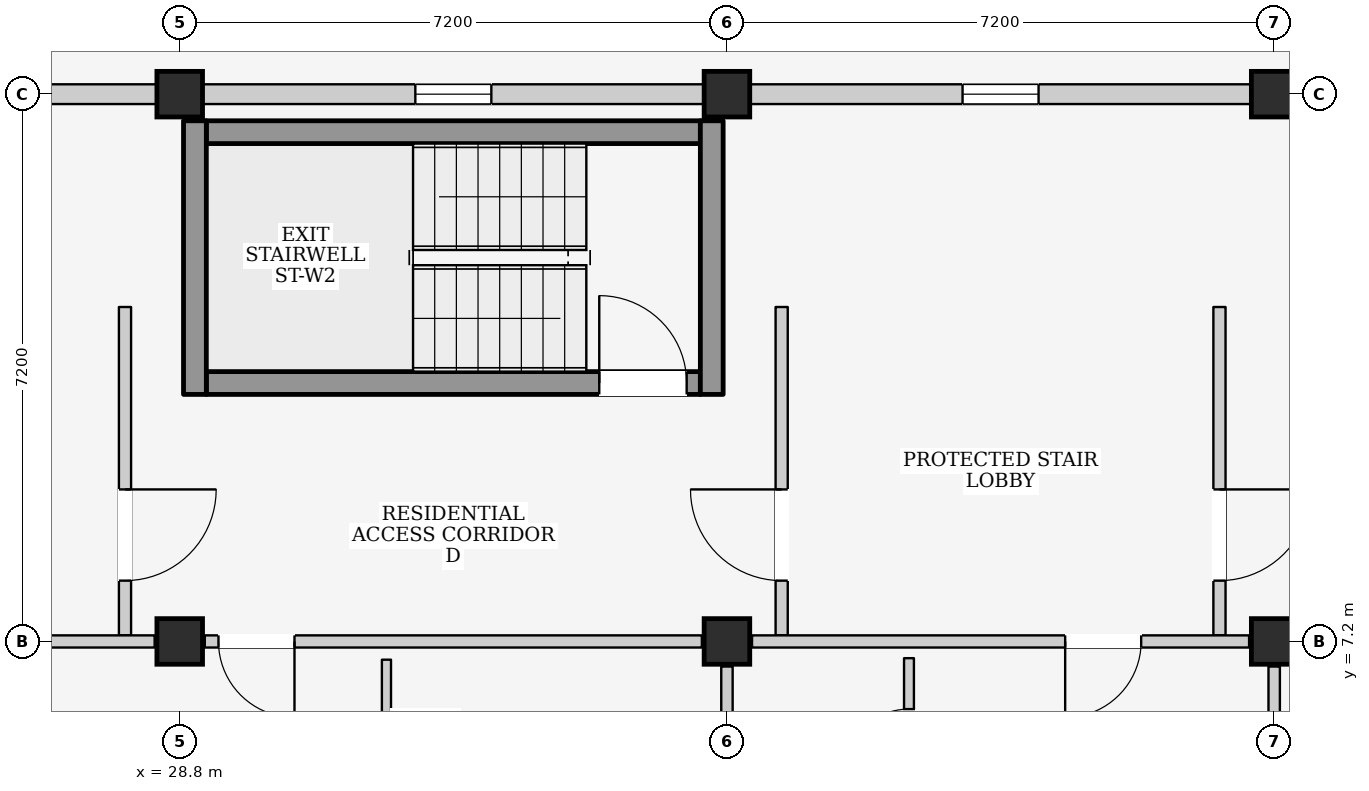
"""IFC4 building model, lengths in metres.
Left out: names, types, materials, properties, quantities, classifications, styles, units other than length and angle.
Written with IfcOpenShell. Run it as: python <this file> out.ifc"""

import sys

from ifc_helpers import new_model, si_unit, direction, frame, frame_2d, origin, origin_2d, place, context, subcontext, project, spatial, rectangle, extrude, element, fill, save


model = new_model("IFC4")
c1 = context("Model", 3, precision=1e-05, world=origin(), true_north=direction((0.0, 1.0)))
c2 = subcontext(c1, "Body", "Model", "MODEL_VIEW")
j1 = project(units=[si_unit("LENGTHUNIT", "METRE"), si_unit("PLANEANGLEUNIT", "RADIAN")], contexts=[c1])
p1 = place(None, origin())
s1 = spatial("IfcSite", under=j1, at=p1, CompositionType="ELEMENT")
p2 = place(p1, origin())
s2 = spatial("IfcBuilding", under=s1, at=p2, CompositionType="ELEMENT")
p3 = place(p2, frame((0.0, 0.0, 15.4)))
s3 = spatial("IfcBuildingStorey", under=s2, at=p3, CompositionType="ELEMENT", Elevation=15.4)
for number, where, z_axis, x_axis in (
    (1, (28.8, 7.2, 0.0), (0.0, 0.0, 1.0), (1.0, 0.0, 0.0)),
    (2, (28.8, 14.4, 0.0), (0.0, 0.0, 1.0), (1.0, 0.0, 0.0)),
    (3, (36.0, 7.2, 0.0), (0.0, 0.0, 1.0), (1.0, 0.0, 0.0)),
    (4, (36.0, 14.4, 0.0), (0.0, 0.0, 1.0), (1.0, 0.0, 0.0)),
    (5, (43.2, 7.2, 0.0), (0.0, 0.0, 1.0), (1.0, 0.0, 0.0)),
    (6, (43.2, 14.4, 0.0), (0.0, 0.0, 1.0), (1.0, 0.0, 0.0)),
):
    element("IfcColumn", number, at=place(p3, frame(where, z_axis=z_axis, x_axis=x_axis)), inside=s3, PredefinedType="COLUMN", context=c2, shape_type="SweptSolid", body=[
        extrude(rectangle(XDim=0.6, YDim=0.6, at=origin_2d()), origin(), (0.0, 0.0, 1.0), 3.2),
    ])
p4 = place(p3, frame((21.9, 14.4, 0.0), z_axis=(0.0, 0.0, 1.0), x_axis=(1.0, 0.0, 0.0)))
e7 = element("IfcWall", 7, at=p4, inside=s3, PredefinedType="ELEMENTEDWALL", context=c2, shape_type="SweptSolid", body=[
    extrude(rectangle(XDim=6.6, YDim=0.26, at=frame_2d((3.3, 0.0))), origin(), (0.0, 0.0, 1.0), 2.335),
])
p5 = place(p4, frame((2.8, 0.0, 1.2)))
e8 = element("IfcOpeningElement", 8, at=p5, cuts=e7, PredefinedType="OPENING", context=c2, shape_type="SweptSolid", body=[
    extrude(rectangle(XDim=1.0, YDim=0.9, at=frame_2d((0.5, 0.45))), frame((0.0, 0.145, 0.0), z_axis=(0.0, -1.0, 0.0), x_axis=(1.0, 0.0, 0.0)), (0.0, 0.0, 1.0), 0.29),
])
p6 = place(p3, frame((29.1, 14.4, 0.0), z_axis=(0.0, 0.0, 1.0), x_axis=(1.0, 0.0, 0.0)))
e9 = element("IfcWall", 9, at=p6, inside=s3, PredefinedType="ELEMENTEDWALL", context=c2, shape_type="SweptSolid", body=[
    extrude(rectangle(XDim=6.6, YDim=0.26, at=frame_2d((3.3, 0.0))), origin(), (0.0, 0.0, 1.0), 2.335),
])
p7 = place(p6, frame((2.8, 0.0, 1.2)))
e10 = element("IfcOpeningElement", 10, at=p7, cuts=e9, PredefinedType="OPENING", context=c2, shape_type="SweptSolid", body=[
    extrude(rectangle(XDim=1.0, YDim=0.9, at=frame_2d((0.5, 0.45))), frame((0.0, 0.145, 0.0), z_axis=(0.0, -1.0, 0.0), x_axis=(1.0, 0.0, 0.0)), (0.0, 0.0, 1.0), 0.29),
])
p8 = place(p3, frame((36.3, 14.4, 0.0), z_axis=(0.0, 0.0, 1.0), x_axis=(1.0, 0.0, 0.0)))
e11 = element("IfcWall", 11, at=p8, inside=s3, PredefinedType="ELEMENTEDWALL", context=c2, shape_type="SweptSolid", body=[
    extrude(rectangle(XDim=6.6, YDim=0.26, at=frame_2d((3.3, 0.0))), origin(), (0.0, 0.0, 1.0), 2.335),
])
p9 = place(p8, frame((2.8, 0.0, 1.2)))
e12 = element("IfcOpeningElement", 12, at=p9, cuts=e11, PredefinedType="OPENING", context=c2, shape_type="SweptSolid", body=[
    extrude(rectangle(XDim=1.0, YDim=0.9, at=frame_2d((0.5, 0.45))), frame((0.0, 0.145, 0.0), z_axis=(0.0, -1.0, 0.0), x_axis=(1.0, 0.0, 0.0)), (0.0, 0.0, 1.0), 0.29),
])
p10 = place(p3, frame((28.08, 7.28, 0.0), z_axis=(0.0, 0.0, 1.0), x_axis=(0.0, 1.0, 0.0)))
e13 = element("IfcWall", 13, at=p10, inside=s3, PredefinedType="PARTITIONING", context=c2, shape_type="SweptSolid", body=[
    extrude(rectangle(XDim=4.32, YDim=0.16, at=frame_2d((2.16, 0.0))), origin(), (0.0, 0.0, 1.0), 2.95),
])
p11 = place(p10, frame((0.72, 0.0, 0.0)))
e14 = element("IfcOpeningElement", 14, at=p11, cuts=e13, PredefinedType="OPENING", context=c2, shape_type="SweptSolid", body=[
    extrude(rectangle(XDim=1.2, YDim=2.2, at=frame_2d((0.6, 1.1))), frame((0.0, 0.095, 0.0), z_axis=(0.0, -1.0, 0.0), x_axis=(1.0, 0.0, 0.0)), (0.0, 0.0, 1.0), 0.19),
])
p12 = place(p3, frame((29.15, 10.6, 0.0), z_axis=(0.0, 0.0, 1.0), x_axis=(1.0, 0.0, 0.0)))
e15 = element("IfcWall", 15, at=p12, inside=s3, PredefinedType="SHEAR", context=c2, shape_type="SweptSolid", body=[
    extrude(rectangle(XDim=6.5, YDim=0.3, at=frame_2d((3.25, 0.0))), origin(), (0.0, 0.0, 1.0), 2.95),
])
p13 = place(p12, frame((5.17, 0.0, 0.0)))
e16 = element("IfcOpeningElement", 16, at=p13, cuts=e15, PredefinedType="OPENING", context=c2, shape_type="SweptSolid", body=[
    extrude(rectangle(XDim=1.15, YDim=2.2, at=frame_2d((0.575, 1.1))), frame((0.0, 0.165, 0.0), z_axis=(0.0, -1.0, 0.0), x_axis=(1.0, 0.0, 0.0)), (0.0, 0.0, 1.0), 0.33),
])
p14 = place(p3, frame((29.15, 13.9, 0.0), z_axis=(0.0, 0.0, 1.0), x_axis=(1.0, 0.0, 0.0)))
e17 = element("IfcWall", 17, at=p14, inside=s3, PredefinedType="SHEAR", context=c2, shape_type="SweptSolid", body=[
    extrude(rectangle(XDim=6.5, YDim=0.3, at=frame_2d((3.25, 0.0))), origin(), (0.0, 0.0, 1.0), 2.95),
])
for number, where, z_axis, x_axis in (
    (18, (29.0, 10.45, 0.0), (0.0, 0.0, 1.0), (0.0, 1.0, 0.0)),
    (19, (35.8, 10.45, 0.0), (0.0, 0.0, 1.0), (0.0, 1.0, 0.0)),
):
    element("IfcWall", number, at=place(p3, frame(where, z_axis=z_axis, x_axis=x_axis)), inside=s3, PredefinedType="SHEAR", context=c2, shape_type="SweptSolid", body=[
        extrude(rectangle(XDim=3.6, YDim=0.3, at=frame_2d((1.8, 0.0))), origin(), (0.0, 0.0, 1.0), 2.95),
    ])
p15 = place(p3, frame((36.72, 7.28, 0.0), z_axis=(0.0, 0.0, 1.0), x_axis=(0.0, 1.0, 0.0)))
e20 = element("IfcWall", 20, at=p15, inside=s3, PredefinedType="PARTITIONING", context=c2, shape_type="SweptSolid", body=[
    extrude(rectangle(XDim=4.32, YDim=0.16, at=frame_2d((2.16, 0.0))), origin(), (0.0, 0.0, 1.0), 2.95),
])
p16 = place(p15, frame((0.72, 0.0, 0.0)))
e21 = element("IfcOpeningElement", 21, at=p16, cuts=e20, PredefinedType="OPENING", context=c2, shape_type="SweptSolid", body=[
    extrude(rectangle(XDim=1.2, YDim=2.2, at=frame_2d((0.6, 1.1))), frame((0.0, 0.095, 0.0), z_axis=(0.0, -1.0, 0.0), x_axis=(1.0, 0.0, 0.0)), (0.0, 0.0, 1.0), 0.19),
])
p17 = place(p3, frame((42.48, 7.28, 0.0), z_axis=(0.0, 0.0, 1.0), x_axis=(0.0, 1.0, 0.0)))
e22 = element("IfcWall", 22, at=p17, inside=s3, PredefinedType="PARTITIONING", context=c2, shape_type="SweptSolid", body=[
    extrude(rectangle(XDim=4.32, YDim=0.16, at=frame_2d((2.16, 0.0))), origin(), (0.0, 0.0, 1.0), 2.95),
])
p18 = place(p17, frame((0.72, 0.0, 0.0)))
e23 = element("IfcOpeningElement", 23, at=p18, cuts=e22, PredefinedType="OPENING", context=c2, shape_type="SweptSolid", body=[
    extrude(rectangle(XDim=1.2, YDim=2.2, at=frame_2d((0.6, 1.1))), frame((0.0, 0.095, 0.0), z_axis=(0.0, -1.0, 0.0), x_axis=(1.0, 0.0, 0.0)), (0.0, 0.0, 1.0), 0.19),
])
p19 = place(p3, frame((21.93, 7.2, 0.0), z_axis=(0.0, 0.0, 1.0), x_axis=(1.0, 0.0, 0.0)))
e24 = element("IfcWall", 24, at=p19, inside=s3, PredefinedType="PARTITIONING", context=c2, shape_type="SweptSolid", body=[
    extrude(rectangle(XDim=6.54, YDim=0.16, at=frame_2d((3.27, 0.0))), origin(), (0.0, 0.0, 1.0), 2.335),
])
p20 = place(p3, frame((29.13, 7.2, 0.0), z_axis=(0.0, 0.0, 1.0), x_axis=(1.0, 0.0, 0.0)))
e25 = element("IfcWall", 25, at=p20, inside=s3, PredefinedType="PARTITIONING", context=c2, shape_type="SweptSolid", body=[
    extrude(rectangle(XDim=6.54, YDim=0.16, at=frame_2d((3.27, 0.0))), origin(), (0.0, 0.0, 1.0), 2.335),
])
p21 = place(p20, frame((0.18, 0.0, 0.0)))
e26 = element("IfcOpeningElement", 26, at=p21, cuts=e25, PredefinedType="OPENING", context=c2, shape_type="SweptSolid", body=[
    extrude(rectangle(XDim=1.0, YDim=2.15, at=frame_2d((0.5, 1.075))), frame((0.0, 0.095, 0.0), z_axis=(0.0, -1.0, 0.0), x_axis=(1.0, 0.0, 0.0)), (0.0, 0.0, 1.0), 0.19),
])
p22 = place(p3, frame((36.0, 0.33, 0.0), z_axis=(0.0, 0.0, 1.0), x_axis=(0.0, 1.0, 0.0)))
e27 = element("IfcWall", 27, at=p22, inside=s3, PredefinedType="PARTITIONING", context=c2, shape_type="SweptSolid", body=[
    extrude(rectangle(XDim=6.54, YDim=0.15, at=frame_2d((3.27, 0.0))), origin(), (0.0, 0.0, 1.0), 2.385),
])
p23 = place(p3, frame((31.52, 3.92, 0.0), z_axis=(0.0, 0.0, 1.0), x_axis=(0.0, 1.0, 0.0)))
e28 = element("IfcWall", 28, at=p23, inside=s3, PredefinedType="PARTITIONING", context=c2, shape_type="SweptSolid", body=[
    extrude(rectangle(XDim=3.04, YDim=0.12, at=frame_2d((1.52, 0.0))), origin(), (0.0, 0.0, 1.0), 2.95),
])
p24 = place(p23, frame((1.04, 0.0, 0.0)))
e29 = element("IfcOpeningElement", 29, at=p24, cuts=e28, PredefinedType="OPENING", context=c2, shape_type="SweptSolid", body=[
    extrude(rectangle(XDim=0.96, YDim=2.15, at=frame_2d((0.48, 1.075))), frame((0.0, 0.075, 0.0), z_axis=(0.0, -1.0, 0.0), x_axis=(1.0, 0.0, 0.0)), (0.0, 0.0, 1.0), 0.15),
])
p25 = place(p3, frame((36.33, 7.2, 0.0), z_axis=(0.0, 0.0, 1.0), x_axis=(1.0, 0.0, 0.0)))
e30 = element("IfcWall", 30, at=p25, inside=s3, PredefinedType="PARTITIONING", context=c2, shape_type="SweptSolid", body=[
    extrude(rectangle(XDim=6.54, YDim=0.16, at=frame_2d((3.27, 0.0))), origin(), (0.0, 0.0, 1.0), 2.335),
])
p26 = place(p25, frame((4.12, 0.0, 0.0)))
e31 = element("IfcOpeningElement", 31, at=p26, cuts=e30, PredefinedType="OPENING", context=c2, shape_type="SweptSolid", body=[
    extrude(rectangle(XDim=1.0, YDim=2.15, at=frame_2d((0.5, 1.075))), frame((0.0, 0.095, 0.0), z_axis=(0.0, -1.0, 0.0), x_axis=(1.0, 0.0, 0.0)), (0.0, 0.0, 1.0), 0.19),
])
p27 = place(p3, frame((43.2, 0.33, 0.0), z_axis=(0.0, 0.0, 1.0), x_axis=(0.0, 1.0, 0.0)))
e32 = element("IfcWall", 32, at=p27, inside=s3, PredefinedType="PARTITIONING", context=c2, shape_type="SweptSolid", body=[
    extrude(rectangle(XDim=6.54, YDim=0.15, at=frame_2d((3.27, 0.0))), origin(), (0.0, 0.0, 1.0), 2.385),
])
p28 = place(p3, frame((38.395, 4.76, 0.0), z_axis=(0.0, 0.0, 1.0), x_axis=(0.0, 1.0, 0.0)))
e33 = element("IfcWall", 33, at=p28, inside=s3, PredefinedType="PARTITIONING", context=c2, shape_type="SweptSolid", body=[
    extrude(rectangle(XDim=2.22, YDim=0.13, at=frame_2d((1.11, 0.0))), origin(), (0.0, 0.0, 1.0), 2.95),
])
p29 = place(p28, frame((0.67, 0.0, 0.0)))
e34 = element("IfcOpeningElement", 34, at=p29, cuts=e33, PredefinedType="OPENING", context=c2, shape_type="SweptSolid", body=[
    extrude(rectangle(XDim=0.88, YDim=2.1, at=frame_2d((0.44, 1.05))), frame((0.0, 0.08, 0.0), z_axis=(0.0, -1.0, 0.0), x_axis=(1.0, 0.0, 0.0)), (0.0, 0.0, 1.0), 0.16),
])
p30 = place(p7, origin())
e35 = element("IfcWindow", 35, at=p30, inside=s3, PartitioningType="SINGLE_PANEL", PredefinedType="WINDOW", context=c2, shape_type="SweptSolid", body=[
    extrude(rectangle(XDim=1.0, YDim=0.9, at=frame_2d((0.5, 0.45))), frame((0.0, 0.03, 0.0), z_axis=(0.0, -1.0, 0.0), x_axis=(1.0, 0.0, 0.0)), (0.0, 0.0, 1.0), 0.06),
])
fill(e10, e35)
p31 = place(p9, origin())
e36 = element("IfcWindow", 36, at=p31, inside=s3, PartitioningType="SINGLE_PANEL", PredefinedType="WINDOW", context=c2, shape_type="SweptSolid", body=[
    extrude(rectangle(XDim=1.0, YDim=0.9, at=frame_2d((0.5, 0.45))), frame((0.0, 0.03, 0.0), z_axis=(0.0, -1.0, 0.0), x_axis=(1.0, 0.0, 0.0)), (0.0, 0.0, 1.0), 0.06),
])
fill(e12, e36)
p32 = place(p11, frame((1.2, 0.0, 0.0), z_axis=(0.0, 0.0, 1.0), x_axis=(-1.0, 0.0, 0.0)))
e37 = element("IfcDoor", 37, at=p32, inside=s3, OperationType="SINGLE_SWING_LEFT", PredefinedType="DOOR", context=c2, shape_type="SweptSolid", body=[
    extrude(rectangle(XDim=1.2, YDim=2.2, at=frame_2d((0.6, 1.1))), frame((0.0, 0.025, 0.0), z_axis=(0.0, -1.0, 0.0), x_axis=(1.0, 0.0, 0.0)), (0.0, 0.0, 1.0), 0.05),
])
fill(e14, e37)
p33 = place(p13, origin())
e38 = element("IfcDoor", 38, at=p33, inside=s3, OperationType="SINGLE_SWING_LEFT", PredefinedType="DOOR", context=c2, shape_type="SweptSolid", body=[
    extrude(rectangle(XDim=1.15, YDim=2.2, at=frame_2d((0.575, 1.1))), frame((0.0, 0.025, 0.0), z_axis=(0.0, -1.0, 0.0), x_axis=(1.0, 0.0, 0.0)), (0.0, 0.0, 1.0), 0.05),
])
fill(e16, e38)
p34 = place(p16, origin())
e39 = element("IfcDoor", 39, at=p34, inside=s3, OperationType="SINGLE_SWING_RIGHT", PredefinedType="DOOR", context=c2, shape_type="SweptSolid", body=[
    extrude(rectangle(XDim=1.2, YDim=2.2, at=frame_2d((0.6, 1.1))), frame((0.0, 0.025, 0.0), z_axis=(0.0, -1.0, 0.0), x_axis=(1.0, 0.0, 0.0)), (0.0, 0.0, 1.0), 0.05),
])
fill(e21, e39)
p35 = place(p18, frame((1.2, 0.0, 0.0), z_axis=(0.0, 0.0, 1.0), x_axis=(-1.0, 0.0, 0.0)))
e40 = element("IfcDoor", 40, at=p35, inside=s3, OperationType="SINGLE_SWING_LEFT", PredefinedType="DOOR", context=c2, shape_type="SweptSolid", body=[
    extrude(rectangle(XDim=1.2, YDim=2.2, at=frame_2d((0.6, 1.1))), frame((0.0, 0.025, 0.0), z_axis=(0.0, -1.0, 0.0), x_axis=(1.0, 0.0, 0.0)), (0.0, 0.0, 1.0), 0.05),
])
fill(e23, e40)
p36 = place(p21, frame((1.0, 0.0, 0.0), z_axis=(0.0, 0.0, 1.0), x_axis=(-1.0, 0.0, 0.0)))
e41 = element("IfcDoor", 41, at=p36, inside=s3, OperationType="SINGLE_SWING_LEFT", PredefinedType="DOOR", context=c2, shape_type="SweptSolid", body=[
    extrude(rectangle(XDim=1.0, YDim=2.15, at=frame_2d((0.5, 1.075))), frame((0.0, 0.025, 0.0), z_axis=(0.0, -1.0, 0.0), x_axis=(1.0, 0.0, 0.0)), (0.0, 0.0, 1.0), 0.05),
])
fill(e26, e41)
p37 = place(p26, frame((1.0, 0.0, 0.0), z_axis=(0.0, 0.0, 1.0), x_axis=(-1.0, 0.0, 0.0)))
e42 = element("IfcDoor", 42, at=p37, inside=s3, OperationType="SINGLE_SWING_RIGHT", PredefinedType="DOOR", context=c2, shape_type="SweptSolid", body=[
    extrude(rectangle(XDim=1.0, YDim=2.15, at=frame_2d((0.5, 1.075))), frame((0.0, 0.025, 0.0), z_axis=(0.0, -1.0, 0.0), x_axis=(1.0, 0.0, 0.0)), (0.0, 0.0, 1.0), 0.05),
])
fill(e31, e42)
p38 = place(p29, origin())
e43 = element("IfcDoor", 43, at=p38, inside=s3, OperationType="SINGLE_SWING_LEFT", PredefinedType="DOOR", context=c2, shape_type="SweptSolid", body=[
    extrude(rectangle(XDim=0.88, YDim=2.1, at=frame_2d((0.44, 1.05))), frame((0.0, 0.025, 0.0), z_axis=(0.0, -1.0, 0.0), x_axis=(1.0, 0.0, 0.0)), (0.0, 0.0, 1.0), 0.05),
])
fill(e34, e43)
save(model, sys.argv[1])
